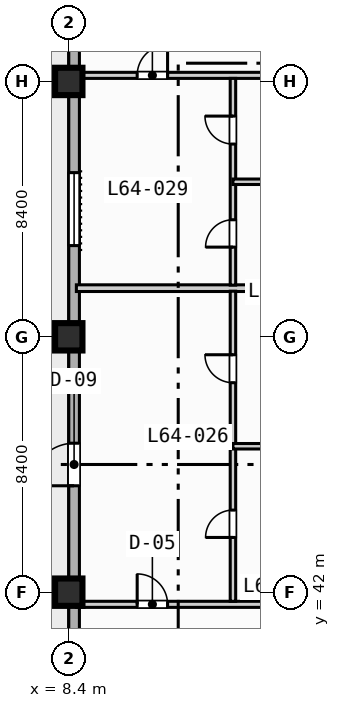
"""IFC4 building model, lengths in metres.
Left out: names, types, materials, properties, quantities, classifications, styles, units other than length and angle.
Written with IfcOpenShell. Run it as: python <this file> out.ifc"""

import sys

from ifc_helpers import new_model, si_unit, direction, frame, frame_2d, origin, origin_2d, place, context, subcontext, project, spatial, rectangle, extrude, element, fill, save


model = new_model("IFC4")
c1 = context("Model", 3, precision=1e-05, world=origin(), true_north=direction((0.0, 1.0)))
c2 = subcontext(c1, "Body", "Model", "MODEL_VIEW")
j1 = project(units=[si_unit("LENGTHUNIT", "METRE"), si_unit("PLANEANGLEUNIT", "RADIAN")], contexts=[c1])
p1 = place(None, origin())
s1 = spatial("IfcSite", under=j1, at=p1, CompositionType="ELEMENT")
p2 = place(p1, origin())
s2 = spatial("IfcBuilding", under=s1, at=p2, CompositionType="ELEMENT")
p3 = place(p2, frame((0.0, 0.0, 260.1)))
s3 = spatial("IfcBuildingStorey", under=s2, at=p3, CompositionType="ELEMENT", Elevation=260.1)
for number, where, z_axis, x_axis in (
    (1, (8.4, 42.0, 0.0), (0.0, 0.0, 1.0), (1.0, 0.0, 0.0)),
    (2, (8.4, 50.4, 0.0), (0.0, 0.0, 1.0), (1.0, 0.0, 0.0)),
    (3, (8.4, 58.8, 0.0), (0.0, 0.0, 1.0), (1.0, 0.0, 0.0)),
):
    element("IfcColumn", number, at=place(p3, frame(where, z_axis=z_axis, x_axis=x_axis)), inside=s3, PredefinedType="COLUMN", context=c2, shape_type="SweptSolid", body=[
        extrude(rectangle(XDim=0.9, YDim=0.9, at=origin_2d()), origin(), (0.0, 0.0, 1.0), 3.7),
    ])
p4 = place(p3, frame((8.575, 11.575, 0.0), z_axis=(0.0, 0.0, 1.0), x_axis=(0.0, 1.0, 0.0)))
e4 = element("IfcWall", 4, at=p4, inside=s3, PredefinedType="STANDARD", context=c2, shape_type="SweptSolid", body=[
    extrude(rectangle(XDim=60.85, YDim=0.35, at=frame_2d((30.425, 0.0))), origin(), (0.0, 0.0, 1.0), 3.47),
])
p5 = place(p4, frame((33.925, 0.0, 0.0)))
e5 = element("IfcOpeningElement", 5, at=p5, cuts=e4, PredefinedType="OPENING", context=c2, shape_type="SweptSolid", body=[
    extrude(rectangle(XDim=1.4, YDim=2.2, at=frame_2d((0.7, 1.1))), frame((0.0, 0.185, 0.0), z_axis=(0.0, -1.0, 0.0), x_axis=(1.0, 0.0, 0.0)), (0.0, 0.0, 1.0), 0.37),
])
p6 = place(p4, frame((16.925, 0.0, 0.85)))
e6 = element("IfcOpeningElement", 6, at=p6, cuts=e4, PredefinedType="OPENING", context=c2, shape_type="SweptSolid", body=[
    extrude(rectangle(XDim=1.8, YDim=1.8, at=frame_2d((0.9, 0.9))), frame((0.0, 0.185, 0.0), z_axis=(0.0, -1.0, 0.0), x_axis=(1.0, 0.0, 0.0)), (0.0, 0.0, 1.0), 0.37),
])
p7 = place(p4, frame((25.025, 0.0, 0.85)))
e7 = element("IfcOpeningElement", 7, at=p7, cuts=e4, PredefinedType="OPENING", context=c2, shape_type="SweptSolid", body=[
    extrude(rectangle(XDim=2.4, YDim=1.95, at=frame_2d((1.2, 0.975))), frame((0.0, 0.185, 0.0), z_axis=(0.0, -1.0, 0.0), x_axis=(1.0, 0.0, 0.0)), (0.0, 0.0, 1.0), 0.37),
])
p8 = place(p4, frame((41.825, 0.0, 0.85)))
e8 = element("IfcOpeningElement", 8, at=p8, cuts=e4, PredefinedType="OPENING", context=c2, shape_type="SweptSolid", body=[
    extrude(rectangle(XDim=2.4, YDim=1.95, at=frame_2d((1.2, 0.975))), frame((0.0, 0.185, 0.0), z_axis=(0.0, -1.0, 0.0), x_axis=(1.0, 0.0, 0.0)), (0.0, 0.0, 1.0), 0.37),
])
p9 = place(p3, frame((8.65, 41.6, 0.0), z_axis=(0.0, 0.0, 1.0), x_axis=(1.0, 0.0, 0.0)))
e9 = element("IfcWall", 9, at=p9, inside=s3, PredefinedType="PARTITIONING", context=c2, shape_type="SweptSolid", body=[
    extrude(rectangle(XDim=7.95, YDim=0.2, at=frame_2d((3.975, 0.0))), origin(), (0.0, 0.0, 1.0), 3.47),
])
p10 = place(p9, frame((2.0, 0.0, 0.0)))
e10 = element("IfcOpeningElement", 10, at=p10, cuts=e9, PredefinedType="OPENING", context=c2, shape_type="SweptSolid", body=[
    extrude(rectangle(XDim=1.0, YDim=2.15, at=frame_2d((0.5, 1.075))), frame((0.0, 0.11, 0.0), z_axis=(0.0, -1.0, 0.0), x_axis=(1.0, 0.0, 0.0)), (0.0, 0.0, 1.0), 0.22),
])
p11 = place(p3, frame((8.65, 59.0, 0.0), z_axis=(0.0, 0.0, 1.0), x_axis=(1.0, 0.0, 0.0)))
e11 = element("IfcWall", 11, at=p11, inside=s3, PredefinedType="PARTITIONING", context=c2, shape_type="SweptSolid", body=[
    extrude(rectangle(XDim=7.95, YDim=0.2, at=frame_2d((3.975, 0.0))), origin(), (0.0, 0.0, 1.0), 2.82),
])
p12 = place(p11, frame((2.0, 0.0, 0.0)))
e12 = element("IfcOpeningElement", 12, at=p12, cuts=e11, PredefinedType="OPENING", context=c2, shape_type="SweptSolid", body=[
    extrude(rectangle(XDim=1.0, YDim=2.15, at=frame_2d((0.5, 1.075))), frame((0.0, 0.11, 0.0), z_axis=(0.0, -1.0, 0.0), x_axis=(1.0, 0.0, 0.0)), (0.0, 0.0, 1.0), 0.22),
])
p13 = place(p3, frame((8.65, 52.0, 0.0), z_axis=(0.0, 0.0, 1.0), x_axis=(1.0, 0.0, 0.0)))
e13 = element("IfcWall", 13, at=p13, inside=s3, PredefinedType="PARTITIONING", context=c2, shape_type="SweptSolid", body=[
    extrude(rectangle(XDim=7.95, YDim=0.22, at=frame_2d((3.975, 0.0))), origin(), (0.0, 0.0, 1.0), 3.47),
])
p14 = place(p3, frame((13.8, 41.7, 0.0), z_axis=(0.0, 0.0, 1.0), x_axis=(0.0, 1.0, 0.0)))
e14 = element("IfcWall", 14, at=p14, inside=s3, PredefinedType="PLUMBINGWALL", context=c2, shape_type="SweptSolid", body=[
    extrude(rectangle(XDim=10.2, YDim=0.18, at=frame_2d((5.1, 0.0))), origin(), (0.0, 0.0, 1.0), 3.47),
])
p15 = place(p14, frame((2.1, 0.0, 0.0)))
e15 = element("IfcOpeningElement", 15, at=p15, cuts=e14, PredefinedType="OPENING", context=c2, shape_type="SweptSolid", body=[
    extrude(rectangle(XDim=0.9, YDim=2.1, at=frame_2d((0.45, 1.05))), frame((0.0, 0.1, 0.0), z_axis=(0.0, -1.0, 0.0), x_axis=(1.0, 0.0, 0.0)), (0.0, 0.0, 1.0), 0.2),
])
p16 = place(p14, frame((7.19, 0.0, 0.0)))
e16 = element("IfcOpeningElement", 16, at=p16, cuts=e14, PredefinedType="OPENING", context=c2, shape_type="SweptSolid", body=[
    extrude(rectangle(XDim=0.92, YDim=2.1, at=frame_2d((0.46, 1.05))), frame((0.0, 0.1, 0.0), z_axis=(0.0, -1.0, 0.0), x_axis=(1.0, 0.0, 0.0)), (0.0, 0.0, 1.0), 0.2),
])
p17 = place(p3, frame((13.8, 46.8, 0.0), z_axis=(0.0, 0.0, 1.0), x_axis=(1.0, 0.0, 0.0)))
e17 = element("IfcWall", 17, at=p17, inside=s3, PredefinedType="PLUMBINGWALL", context=c2, shape_type="SweptSolid", body=[
    extrude(rectangle(XDim=2.8, YDim=0.18, at=frame_2d((1.4, 0.0))), origin(), (0.0, 0.0, 1.0), 3.47),
])
p18 = place(p3, frame((13.8, 52.1, 0.0), z_axis=(0.0, 0.0, 1.0), x_axis=(0.0, 1.0, 0.0)))
e18 = element("IfcWall", 18, at=p18, inside=s3, PredefinedType="PLUMBINGWALL", context=c2, shape_type="SweptSolid", body=[
    extrude(rectangle(XDim=6.8, YDim=0.18, at=frame_2d((3.4, 0.0))), origin(), (0.0, 0.0, 1.0), 3.47),
])
p19 = place(p18, frame((1.25, 0.0, 0.0)))
e19 = element("IfcOpeningElement", 19, at=p19, cuts=e18, PredefinedType="OPENING", context=c2, shape_type="SweptSolid", body=[
    extrude(rectangle(XDim=0.9, YDim=2.1, at=frame_2d((0.45, 1.05))), frame((0.0, 0.1, 0.0), z_axis=(0.0, -1.0, 0.0), x_axis=(1.0, 0.0, 0.0)), (0.0, 0.0, 1.0), 0.2),
])
p20 = place(p18, frame((4.64, 0.0, 0.0)))
e20 = element("IfcOpeningElement", 20, at=p20, cuts=e18, PredefinedType="OPENING", context=c2, shape_type="SweptSolid", body=[
    extrude(rectangle(XDim=0.92, YDim=2.1, at=frame_2d((0.46, 1.05))), frame((0.0, 0.1, 0.0), z_axis=(0.0, -1.0, 0.0), x_axis=(1.0, 0.0, 0.0)), (0.0, 0.0, 1.0), 0.2),
])
p21 = place(p3, frame((13.8, 55.5, 0.0), z_axis=(0.0, 0.0, 1.0), x_axis=(1.0, 0.0, 0.0)))
e21 = element("IfcWall", 21, at=p21, inside=s3, PredefinedType="PLUMBINGWALL", context=c2, shape_type="SweptSolid", body=[
    extrude(rectangle(XDim=2.8, YDim=0.18, at=frame_2d((1.4, 0.0))), origin(), (0.0, 0.0, 1.0), 3.47),
])
p22 = place(p5, origin())
e22 = element("IfcDoor", 22, at=p22, inside=s3, OperationType="SINGLE_SWING_LEFT", PredefinedType="DOOR", context=c2, shape_type="SweptSolid", body=[
    extrude(rectangle(XDim=1.4, YDim=2.2, at=frame_2d((0.7, 1.1))), frame((0.0, 0.025, 0.0), z_axis=(0.0, -1.0, 0.0), x_axis=(1.0, 0.0, 0.0)), (0.0, 0.0, 1.0), 0.05),
])
fill(e5, e22)
p23 = place(p8, origin())
e23 = element("IfcWindow", 23, at=p23, inside=s3, PartitioningType="SINGLE_PANEL", PredefinedType="WINDOW", context=c2, shape_type="SweptSolid", body=[
    extrude(rectangle(XDim=2.4, YDim=1.95, at=frame_2d((1.2, 0.975))), frame((0.0, 0.03, 0.0), z_axis=(0.0, -1.0, 0.0), x_axis=(1.0, 0.0, 0.0)), (0.0, 0.0, 1.0), 0.06),
])
fill(e8, e23)
p24 = place(p10, origin())
e24 = element("IfcDoor", 24, at=p24, inside=s3, OperationType="SINGLE_SWING_LEFT", PredefinedType="DOOR", context=c2, shape_type="SweptSolid", body=[
    extrude(rectangle(XDim=1.0, YDim=2.15, at=frame_2d((0.5, 1.075))), frame((0.0, 0.025, 0.0), z_axis=(0.0, -1.0, 0.0), x_axis=(1.0, 0.0, 0.0)), (0.0, 0.0, 1.0), 0.05),
])
fill(e10, e24)
p25 = place(p12, origin())
e25 = element("IfcDoor", 25, at=p25, inside=s3, OperationType="SINGLE_SWING_RIGHT", PredefinedType="DOOR", context=c2, shape_type="SweptSolid", body=[
    extrude(rectangle(XDim=1.0, YDim=2.15, at=frame_2d((0.5, 1.075))), frame((0.0, 0.025, 0.0), z_axis=(0.0, -1.0, 0.0), x_axis=(1.0, 0.0, 0.0)), (0.0, 0.0, 1.0), 0.05),
])
fill(e12, e25)
p26 = place(p15, origin())
e26 = element("IfcDoor", 26, at=p26, inside=s3, OperationType="SINGLE_SWING_LEFT", PredefinedType="DOOR", context=c2, shape_type="SweptSolid", body=[
    extrude(rectangle(XDim=0.9, YDim=2.1, at=frame_2d((0.45, 1.05))), frame((0.0, 0.025, 0.0), z_axis=(0.0, -1.0, 0.0), x_axis=(1.0, 0.0, 0.0)), (0.0, 0.0, 1.0), 0.05),
])
fill(e15, e26)
p27 = place(p16, origin())
e27 = element("IfcDoor", 27, at=p27, inside=s3, OperationType="SINGLE_SWING_RIGHT", PredefinedType="DOOR", context=c2, shape_type="SweptSolid", body=[
    extrude(rectangle(XDim=0.92, YDim=2.1, at=frame_2d((0.46, 1.05))), frame((0.0, 0.025, 0.0), z_axis=(0.0, -1.0, 0.0), x_axis=(1.0, 0.0, 0.0)), (0.0, 0.0, 1.0), 0.05),
])
fill(e16, e27)
p28 = place(p19, origin())
e28 = element("IfcDoor", 28, at=p28, inside=s3, OperationType="SINGLE_SWING_LEFT", PredefinedType="DOOR", context=c2, shape_type="SweptSolid", body=[
    extrude(rectangle(XDim=0.9, YDim=2.1, at=frame_2d((0.45, 1.05))), frame((0.0, 0.025, 0.0), z_axis=(0.0, -1.0, 0.0), x_axis=(1.0, 0.0, 0.0)), (0.0, 0.0, 1.0), 0.05),
])
fill(e19, e28)
p29 = place(p20, origin())
e29 = element("IfcDoor", 29, at=p29, inside=s3, OperationType="SINGLE_SWING_RIGHT", PredefinedType="DOOR", context=c2, shape_type="SweptSolid", body=[
    extrude(rectangle(XDim=0.92, YDim=2.1, at=frame_2d((0.46, 1.05))), frame((0.0, 0.025, 0.0), z_axis=(0.0, -1.0, 0.0), x_axis=(1.0, 0.0, 0.0)), (0.0, 0.0, 1.0), 0.05),
])
fill(e20, e29)
save(model, sys.argv[1])
